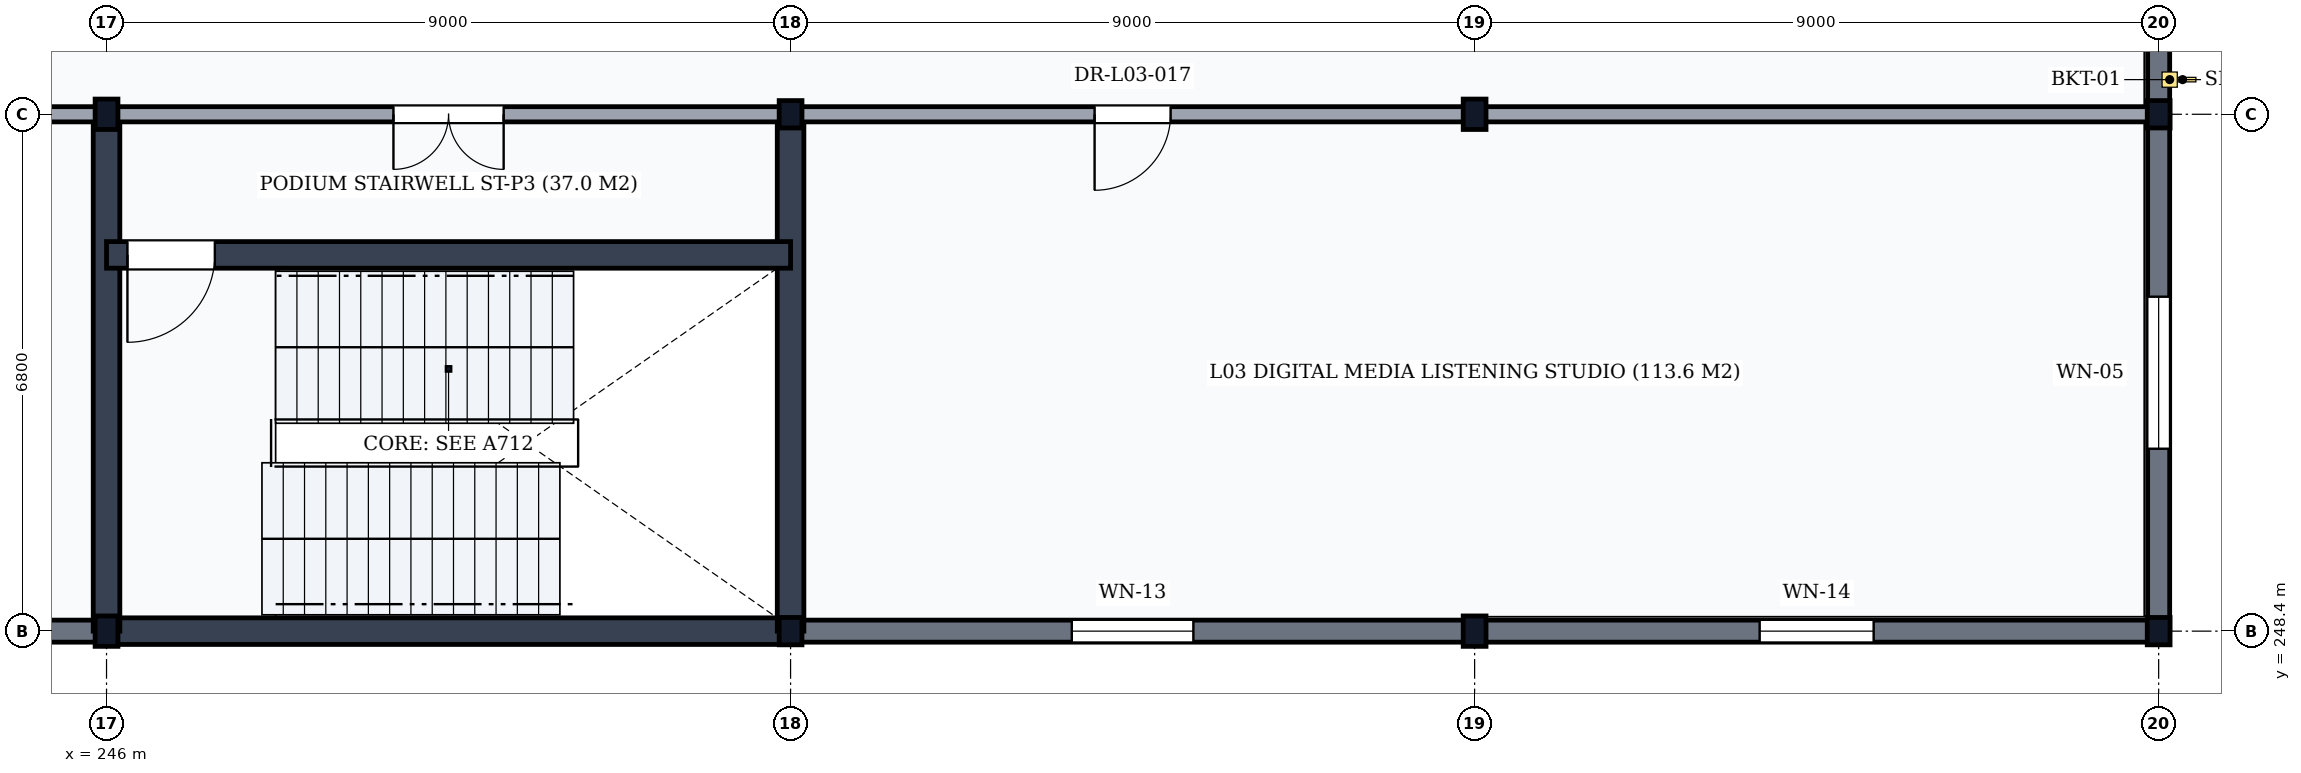
"""IFC4 building model, lengths in metres.
Left out: names, types, materials, properties, quantities, classifications, styles, units other than length and angle.
Written with IfcOpenShell. Run it as: python <this file> out.ifc"""

import sys

from ifc_helpers import new_model, si_unit, direction, frame, frame_2d, origin, origin_2d, place, context, subcontext, project, spatial, rectangle, i_section, extrude, element, fill, save


model = new_model("IFC4")
c1 = context("Model", 3, precision=1e-05, world=origin(), true_north=direction((0.0, 1.0)))
c2 = subcontext(c1, "Body", "Model", "MODEL_VIEW")
j1 = project(units=[si_unit("LENGTHUNIT", "METRE"), si_unit("PLANEANGLEUNIT", "RADIAN")], contexts=[c1])
p1 = place(None, origin())
s1 = spatial("IfcSite", under=j1, at=p1, CompositionType="ELEMENT")
p2 = place(p1, origin())
s2 = spatial("IfcBuilding", under=s1, at=p2, CompositionType="ELEMENT")
p3 = place(p2, frame((0.0, 0.0, 10.5)))
s3 = spatial("IfcBuildingStorey", under=s2, at=p3, CompositionType="ELEMENT", Elevation=10.5)
for number, where, z_axis, x_axis in (
    (1, (246.0, 248.4, 0.0), (0.0, 0.0, 1.0), (1.0, 0.0, 0.0)),
    (2, (246.0, 255.2, 0.0), (0.0, 0.0, 1.0), (1.0, 0.0, 0.0)),
):
    element("IfcColumn", number, at=place(p3, frame(where, z_axis=z_axis, x_axis=x_axis)), inside=s3, PredefinedType="COLUMN", context=c2, shape_type="SweptSolid", body=[
        extrude(i_section(OverallWidth=0.3, OverallDepth=0.4, WebThickness=0.013, FlangeThickness=0.024, FilletRadius=0.027, at=origin_2d()), origin(), (0.0, 0.0, 1.0), 5.1),
    ])
for number, where, z_axis, x_axis in (
    (3, (255.0, 248.4, 0.0), (0.0, 0.0, 1.0), (1.0, 0.0, 0.0)),
    (4, (255.0, 255.2, 0.0), (0.0, 0.0, 1.0), (1.0, 0.0, 0.0)),
):
    element("IfcColumn", number, at=place(p3, frame(where, z_axis=z_axis, x_axis=x_axis)), inside=s3, PredefinedType="COLUMN", context=c2, shape_type="SweptSolid", body=[
        extrude(i_section(OverallWidth=0.3, OverallDepth=0.36, WebThickness=0.012, FlangeThickness=0.022, FilletRadius=0.027, at=origin_2d()), origin(), (0.0, 0.0, 1.0), 5.1),
    ])
for number, where, z_axis, x_axis in (
    (5, (264.0, 248.4, 0.0), (0.0, 0.0, 1.0), (1.0, 0.0, 0.0)),
    (6, (264.0, 255.2, 0.0), (0.0, 0.0, 1.0), (1.0, 0.0, 0.0)),
):
    element("IfcColumn", number, at=place(p3, frame(where, z_axis=z_axis, x_axis=x_axis)), inside=s3, PredefinedType="COLUMN", context=c2, shape_type="SweptSolid", body=[
        extrude(i_section(OverallWidth=0.3, OverallDepth=0.4, WebThickness=0.013, FlangeThickness=0.024, FilletRadius=0.027, at=origin_2d()), origin(), (0.0, 0.0, 1.0), 5.1),
    ])
for number, where, z_axis, x_axis in (
    (7, (273.0, 248.4, 0.0), (0.0, 0.0, 1.0), (1.0, 0.0, 0.0)),
    (8, (273.0, 255.2, 0.0), (0.0, 0.0, 1.0), (1.0, 0.0, 0.0)),
):
    element("IfcColumn", number, at=place(p3, frame(where, z_axis=z_axis, x_axis=x_axis)), inside=s3, PredefinedType="COLUMN", context=c2, shape_type="SweptSolid", body=[
        extrude(i_section(OverallWidth=0.3, OverallDepth=0.36, WebThickness=0.012, FlangeThickness=0.022, FilletRadius=0.027, at=origin_2d()), origin(), (0.0, 0.0, 1.0), 5.1),
    ])
p4 = place(p3, frame((237.006, 248.4, 0.0), z_axis=(0.0, 0.0, 1.0), x_axis=(1.0, 0.0, 0.0)))
e9 = element("IfcWall", 9, at=p4, inside=s3, PredefinedType="SOLIDWALL", context=c2, shape_type="SweptSolid", body=[
    extrude(rectangle(XDim=8.988, YDim=0.29, at=frame_2d((4.494, 0.0))), origin(), (0.0, 0.0, 1.0), 4.488),
])
p5 = place(p4, frame((3.494, 0.0, 0.95)))
e10 = element("IfcOpeningElement", 10, at=p5, cuts=e9, PredefinedType="OPENING", context=c2, shape_type="SweptSolid", body=[
    extrude(rectangle(XDim=2.0, YDim=2.1, at=frame_2d((1.0, 1.05))), frame((0.0, 0.16, 0.0), z_axis=(0.0, -1.0, 0.0), x_axis=(1.0, 0.0, 0.0)), (0.0, 0.0, 1.0), 0.32),
])
p6 = place(p3, frame((255.006, 248.4, 0.0), z_axis=(0.0, 0.0, 1.0), x_axis=(1.0, 0.0, 0.0)))
e11 = element("IfcWall", 11, at=p6, inside=s3, PredefinedType="SOLIDWALL", context=c2, shape_type="SweptSolid", body=[
    extrude(rectangle(XDim=8.988, YDim=0.29, at=frame_2d((4.494, 0.0))), origin(), (0.0, 0.0, 1.0), 4.488),
])
p7 = place(p6, frame((3.694, 0.0, 0.95)))
e12 = element("IfcOpeningElement", 12, at=p7, cuts=e11, PredefinedType="OPENING", context=c2, shape_type="SweptSolid", body=[
    extrude(rectangle(XDim=1.6, YDim=2.0, at=frame_2d((0.8, 1.0))), frame((0.0, 0.16, 0.0), z_axis=(0.0, -1.0, 0.0), x_axis=(1.0, 0.0, 0.0)), (0.0, 0.0, 1.0), 0.32),
])
p8 = place(p3, frame((264.006, 248.4, 0.0), z_axis=(0.0, 0.0, 1.0), x_axis=(1.0, 0.0, 0.0)))
e13 = element("IfcWall", 13, at=p8, inside=s3, PredefinedType="SOLIDWALL", context=c2, shape_type="SweptSolid", body=[
    extrude(rectangle(XDim=8.988, YDim=0.29, at=frame_2d((4.494, 0.0))), origin(), (0.0, 0.0, 1.0), 4.488),
])
p9 = place(p8, frame((3.744, 0.0, 0.95)))
e14 = element("IfcOpeningElement", 14, at=p9, cuts=e13, PredefinedType="OPENING", context=c2, shape_type="SweptSolid", body=[
    extrude(rectangle(XDim=1.5, YDim=1.9, at=frame_2d((0.75, 0.95))), frame((0.0, 0.16, 0.0), z_axis=(0.0, -1.0, 0.0), x_axis=(1.0, 0.0, 0.0)), (0.0, 0.0, 1.0), 0.32),
])
p10 = place(p3, frame((273.0, 248.406, 0.0), z_axis=(0.0, 0.0, 1.0), x_axis=(0.0, 1.0, 0.0)))
e15 = element("IfcWall", 15, at=p10, inside=s3, PredefinedType="SOLIDWALL", context=c2, shape_type="SweptSolid", body=[
    extrude(rectangle(XDim=6.788, YDim=0.29, at=frame_2d((3.394, 0.0))), origin(), (0.0, 0.0, 1.0), 4.618),
])
p11 = place(p10, frame((2.394, 0.0, 0.95)))
e16 = element("IfcOpeningElement", 16, at=p11, cuts=e15, PredefinedType="OPENING", context=c2, shape_type="SweptSolid", body=[
    extrude(rectangle(XDim=2.0, YDim=2.6, at=frame_2d((1.0, 1.3))), frame((0.0, 0.16, 0.0), z_axis=(0.0, -1.0, 0.0), x_axis=(1.0, 0.0, 0.0)), (0.0, 0.0, 1.0), 0.32),
])
p12 = place(p3, frame((273.0, 255.206, 0.0), z_axis=(0.0, 0.0, 1.0), x_axis=(0.0, 1.0, 0.0)))
e17 = element("IfcWall", 17, at=p12, inside=s3, PredefinedType="SOLIDWALL", context=c2, shape_type="SweptSolid", body=[
    extrude(rectangle(XDim=7.588, YDim=0.29, at=frame_2d((3.794, 0.0))), origin(), (0.0, 0.0, 1.0), 4.578),
])
p13 = place(p12, frame((4.166, 0.0, 0.95)))
e18 = element("IfcOpeningElement", 18, at=p13, cuts=e17, PredefinedType="OPENING", context=c2, shape_type="SweptSolid", body=[
    extrude(rectangle(XDim=1.8, YDim=2.6, at=frame_2d((0.9, 1.3))), frame((0.0, 0.16, 0.0), z_axis=(0.0, -1.0, 0.0), x_axis=(1.0, 0.0, 0.0)), (0.0, 0.0, 1.0), 0.32),
])
p14 = place(p3, frame((264.1, 248.5, 5.1), z_axis=(0.0, 0.0, 1.0), x_axis=(1.0, 0.0, 0.0)))
e19 = element("IfcWall", 19, at=p14, inside=s3, PredefinedType="PARAPET", context=c2, shape_type="SweptSolid", body=[
    extrude(rectangle(XDim=8.8, YDim=0.18, at=frame_2d((4.4, 0.0))), origin(), (0.0, 0.0, 1.0), 1.2),
])
p15 = place(p3, frame((272.9, 248.6, 5.1), z_axis=(0.0, 0.0, 1.0), x_axis=(0.0, 1.0, 0.0)))
e20 = element("IfcWall", 20, at=p15, inside=s3, PredefinedType="PARAPET", context=c2, shape_type="SweptSolid", body=[
    extrude(rectangle(XDim=74.8, YDim=0.18, at=frame_2d((37.4, 0.0))), origin(), (0.0, 0.0, 1.0), 1.2),
])
p16 = place(p3, frame((246.0, 248.4, 0.0), z_axis=(0.0, 0.0, 1.0), x_axis=(1.0, 0.0, 0.0)))
e21 = element("IfcWall", 21, at=p16, inside=s3, PredefinedType="SHEAR", context=c2, shape_type="SweptSolid", body=[
    extrude(rectangle(XDim=9.0, YDim=0.35, at=frame_2d((4.5, 0.0))), origin(), (0.0, 0.0, 1.0), 4.84),
])
for number, where, z_axis, x_axis in (
    (22, (246.0, 248.4, 0.0), (0.0, 0.0, 1.0), (0.0, 1.0, 0.0)),
    (23, (255.0, 248.4, 0.0), (0.0, 0.0, 1.0), (0.0, 1.0, 0.0)),
):
    element("IfcWall", number, at=place(p3, frame(where, z_axis=z_axis, x_axis=x_axis)), inside=s3, PredefinedType="SHEAR", context=c2, shape_type="SweptSolid", body=[
        extrude(rectangle(XDim=6.8, YDim=0.35, at=frame_2d((3.4, 0.0))), origin(), (0.0, 0.0, 1.0), 4.84),
    ])
p17 = place(p3, frame((246.0, 253.35, 0.0), z_axis=(0.0, 0.0, 1.0), x_axis=(1.0, 0.0, 0.0)))
e24 = element("IfcWall", 24, at=p17, inside=s3, PredefinedType="SHEAR", context=c2, shape_type="SweptSolid", body=[
    extrude(rectangle(XDim=9.0, YDim=0.35, at=frame_2d((4.5, 0.0))), origin(), (0.0, 0.0, 1.0), 4.84),
])
p18 = place(p17, frame((0.275, 0.0, 0.0)))
e25 = element("IfcOpeningElement", 25, at=p18, cuts=e24, PredefinedType="OPENING", context=c2, shape_type="SweptSolid", body=[
    extrude(rectangle(XDim=1.15, YDim=2.15, at=frame_2d((0.575, 1.075))), frame((0.0, 0.19, 0.0), z_axis=(0.0, -1.0, 0.0), x_axis=(1.0, 0.0, 0.0)), (0.0, 0.0, 1.0), 0.38),
])
p19 = place(p3, frame((246.0, 255.2, 0.0), z_axis=(0.0, 0.0, 1.0), x_axis=(1.0, 0.0, 0.0)))
e26 = element("IfcWall", 26, at=p19, inside=s3, PredefinedType="PARTITIONING", context=c2, shape_type="SweptSolid", body=[
    extrude(rectangle(XDim=9.0, YDim=0.2, at=frame_2d((4.5, 0.0))), origin(), (0.0, 0.0, 1.0), 4.288),
])
p20 = place(p19, frame((3.775, 0.0, 0.0)))
e27 = element("IfcOpeningElement", 27, at=p20, cuts=e26, PredefinedType="OPENING", context=c2, shape_type="SweptSolid", body=[
    extrude(rectangle(XDim=1.45, YDim=2.2, at=frame_2d((0.725, 1.1))), frame((0.0, 0.115, 0.0), z_axis=(0.0, -1.0, 0.0), x_axis=(1.0, 0.0, 0.0)), (0.0, 0.0, 1.0), 0.23),
])
p21 = place(p3, frame((237.0, 255.2, 0.0), z_axis=(0.0, 0.0, 1.0), x_axis=(1.0, 0.0, 0.0)))
e28 = element("IfcWall", 28, at=p21, inside=s3, PredefinedType="PARTITIONING", context=c2, shape_type="SweptSolid", body=[
    extrude(rectangle(XDim=9.0, YDim=0.2, at=frame_2d((4.5, 0.0))), origin(), (0.0, 0.0, 1.0), 4.288),
])
p22 = place(p21, frame((4.0, 0.0, 0.0)))
e29 = element("IfcOpeningElement", 29, at=p22, cuts=e28, PredefinedType="OPENING", context=c2, shape_type="SweptSolid", body=[
    extrude(rectangle(XDim=1.0, YDim=2.1, at=frame_2d((0.5, 1.05))), frame((0.0, 0.115, 0.0), z_axis=(0.0, -1.0, 0.0), x_axis=(1.0, 0.0, 0.0)), (0.0, 0.0, 1.0), 0.23),
])
p23 = place(p3, frame((255.0, 255.2, 0.0), z_axis=(0.0, 0.0, 1.0), x_axis=(1.0, 0.0, 0.0)))
e30 = element("IfcWall", 30, at=p23, inside=s3, PredefinedType="PARTITIONING", context=c2, shape_type="SweptSolid", body=[
    extrude(rectangle(XDim=18.0, YDim=0.2, at=frame_2d((9.0, 0.0))), origin(), (0.0, 0.0, 1.0), 4.288),
])
p24 = place(p23, frame((4.0, 0.0, 0.0)))
e31 = element("IfcOpeningElement", 31, at=p24, cuts=e30, PredefinedType="OPENING", context=c2, shape_type="SweptSolid", body=[
    extrude(rectangle(XDim=1.0, YDim=2.1, at=frame_2d((0.5, 1.05))), frame((0.0, 0.115, 0.0), z_axis=(0.0, -1.0, 0.0), x_axis=(1.0, 0.0, 0.0)), (0.0, 0.0, 1.0), 0.23),
])
p25 = place(p7, origin())
e32 = element("IfcWindow", 32, at=p25, inside=s3, PartitioningType="SINGLE_PANEL", PredefinedType="WINDOW", context=c2, shape_type="SweptSolid", body=[
    extrude(rectangle(XDim=1.6, YDim=2.0, at=frame_2d((0.8, 1.0))), frame((0.0, 0.03, 0.0), z_axis=(0.0, -1.0, 0.0), x_axis=(1.0, 0.0, 0.0)), (0.0, 0.0, 1.0), 0.06),
])
fill(e12, e32)
p26 = place(p9, origin())
e33 = element("IfcWindow", 33, at=p26, inside=s3, PartitioningType="SINGLE_PANEL", PredefinedType="WINDOW", context=c2, shape_type="SweptSolid", body=[
    extrude(rectangle(XDim=1.5, YDim=1.9, at=frame_2d((0.75, 0.95))), frame((0.0, 0.03, 0.0), z_axis=(0.0, -1.0, 0.0), x_axis=(1.0, 0.0, 0.0)), (0.0, 0.0, 1.0), 0.06),
])
fill(e14, e33)
p27 = place(p11, origin())
e34 = element("IfcWindow", 34, at=p27, inside=s3, PartitioningType="DOUBLE_PANEL_VERTICAL", PredefinedType="WINDOW", context=c2, shape_type="SweptSolid", body=[
    extrude(rectangle(XDim=2.0, YDim=2.6, at=frame_2d((1.0, 1.3))), frame((0.0, 0.03, 0.0), z_axis=(0.0, -1.0, 0.0), x_axis=(1.0, 0.0, 0.0)), (0.0, 0.0, 1.0), 0.06),
])
fill(e16, e34)
p28 = place(p18, frame((1.15, 0.0, 0.0), z_axis=(0.0, 0.0, 1.0), x_axis=(-1.0, 0.0, 0.0)))
e35 = element("IfcDoor", 35, at=p28, inside=s3, OperationType="SINGLE_SWING_RIGHT", PredefinedType="DOOR", context=c2, shape_type="SweptSolid", body=[
    extrude(rectangle(XDim=1.15, YDim=2.15, at=frame_2d((0.575, 1.075))), frame((0.0, 0.025, 0.0), z_axis=(0.0, -1.0, 0.0), x_axis=(1.0, 0.0, 0.0)), (0.0, 0.0, 1.0), 0.05),
])
fill(e25, e35)
p29 = place(p20, frame((1.45, 0.0, 0.0), z_axis=(0.0, 0.0, 1.0), x_axis=(-1.0, 0.0, 0.0)))
e36 = element("IfcDoor", 36, at=p29, inside=s3, OperationType="DOUBLE_DOOR_SINGLE_SWING", PredefinedType="DOOR", context=c2, shape_type="SweptSolid", body=[
    extrude(rectangle(XDim=1.45, YDim=2.2, at=frame_2d((0.725, 1.1))), frame((0.0, 0.025, 0.0), z_axis=(0.0, -1.0, 0.0), x_axis=(1.0, 0.0, 0.0)), (0.0, 0.0, 1.0), 0.05),
])
fill(e27, e36)
p30 = place(p24, frame((1.0, 0.0, 0.0), z_axis=(0.0, 0.0, 1.0), x_axis=(-1.0, 0.0, 0.0)))
e37 = element("IfcDoor", 37, at=p30, inside=s3, OperationType="SINGLE_SWING_RIGHT", PredefinedType="DOOR", context=c2, shape_type="SweptSolid", body=[
    extrude(rectangle(XDim=1.0, YDim=2.1, at=frame_2d((0.5, 1.05))), frame((0.0, 0.025, 0.0), z_axis=(0.0, -1.0, 0.0), x_axis=(1.0, 0.0, 0.0)), (0.0, 0.0, 1.0), 0.05),
])
fill(e31, e37)
save(model, sys.argv[1])
